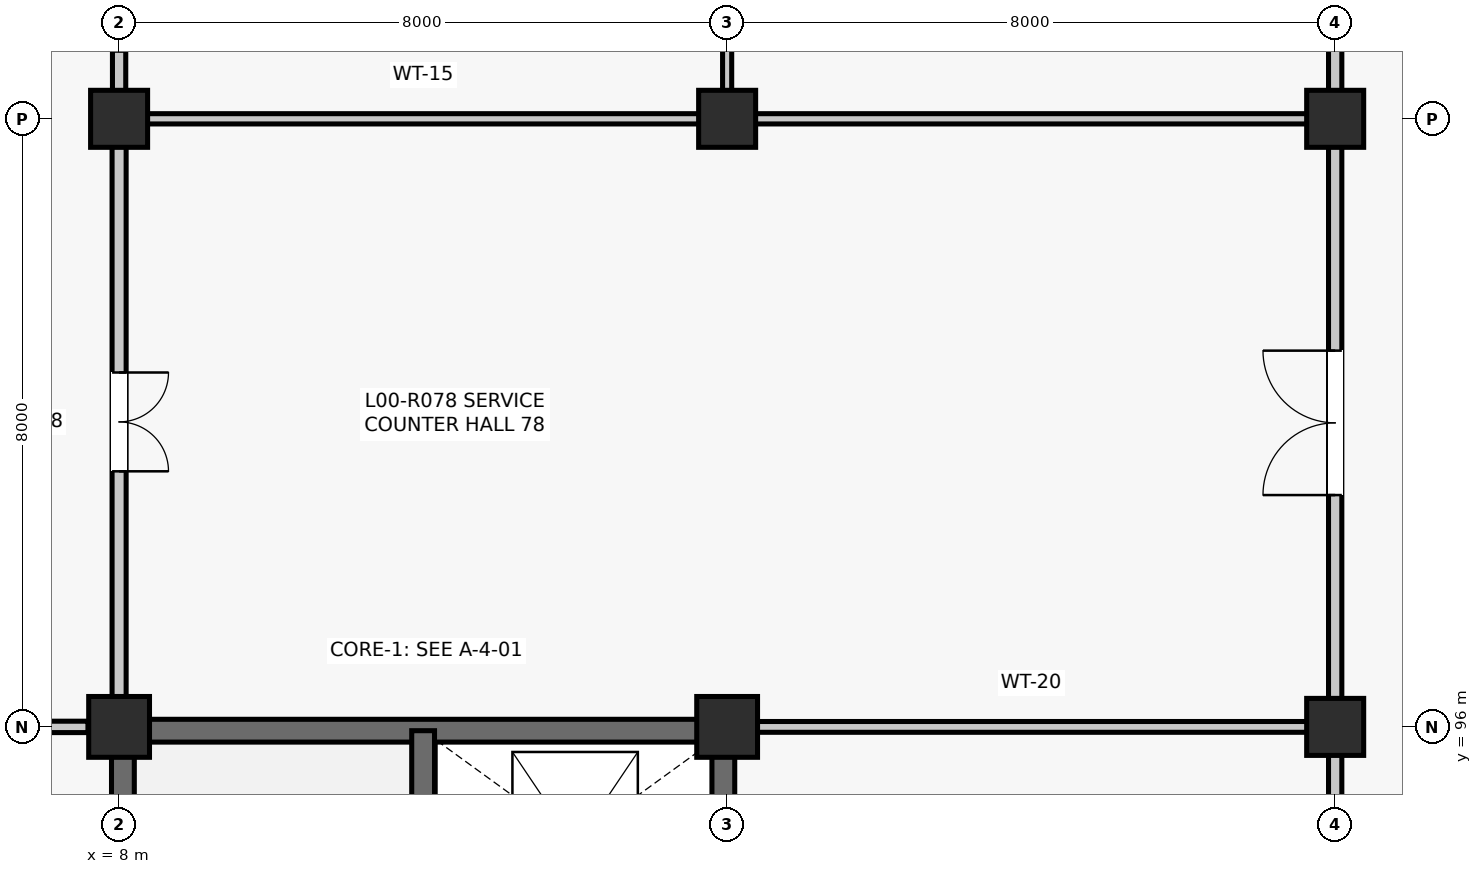
"""IFC4 building model, lengths in metres.
Left out: names, types, materials, properties, quantities, classifications, styles, units other than length and angle.
Written with IfcOpenShell. Run it as: python <this file> out.ifc"""

import sys

from ifc_helpers import new_model, si_unit, direction, frame, frame_2d, origin, origin_2d, place, context, subcontext, project, spatial, rectangle, extrude, element, fill, save


model = new_model("IFC4")
c1 = context("Model", 3, precision=1e-05, world=origin(), true_north=direction((0.0, 1.0)))
c2 = subcontext(c1, "Body", "Model", "MODEL_VIEW")
j1 = project(units=[si_unit("LENGTHUNIT", "METRE"), si_unit("PLANEANGLEUNIT", "RADIAN")], contexts=[c1])
p1 = place(None, origin())
s1 = spatial("IfcSite", under=j1, at=p1, CompositionType="ELEMENT")
p2 = place(p1, origin())
s2 = spatial("IfcBuilding", under=s1, at=p2, CompositionType="ELEMENT")
p3 = place(p2, origin())
s3 = spatial("IfcBuildingStorey", under=s2, at=p3, CompositionType="ELEMENT", Elevation=0.0)
p4 = place(p3, frame((8.0, 96.0, 0.0), z_axis=(0.0, 0.0, 1.0), x_axis=(1.0, 0.0, 0.0)))
e1 = element("IfcColumn", 1, at=p4, inside=s3, PredefinedType="COLUMN", context=c2, shape_type="SweptSolid", body=[
    extrude(rectangle(XDim=0.8, YDim=0.8, at=origin_2d()), origin(), (0.0, 0.0, 1.0), 5.28),
])
p5 = place(p3, frame((8.0, 104.0, 0.0), z_axis=(0.0, 0.0, 1.0), x_axis=(1.0, 0.0, 0.0)))
e2 = element("IfcColumn", 2, at=p5, inside=s3, PredefinedType="COLUMN", context=c2, shape_type="SweptSolid", body=[
    extrude(rectangle(XDim=0.75, YDim=0.75, at=origin_2d()), origin(), (0.0, 0.0, 1.0), 5.28),
])
p6 = place(p3, frame((16.0, 96.0, 0.0), z_axis=(0.0, 0.0, 1.0), x_axis=(1.0, 0.0, 0.0)))
e3 = element("IfcColumn", 3, at=p6, inside=s3, PredefinedType="COLUMN", context=c2, shape_type="SweptSolid", body=[
    extrude(rectangle(XDim=0.8, YDim=0.8, at=origin_2d()), origin(), (0.0, 0.0, 1.0), 5.28),
])
for number, where, z_axis, x_axis in (
    (4, (16.0, 104.0, 0.0), (0.0, 0.0, 1.0), (1.0, 0.0, 0.0)),
    (5, (24.0, 96.0, 0.0), (0.0, 0.0, 1.0), (1.0, 0.0, 0.0)),
    (6, (24.0, 104.0, 0.0), (0.0, 0.0, 1.0), (1.0, 0.0, 0.0)),
):
    element("IfcColumn", number, at=place(p3, frame(where, z_axis=z_axis, x_axis=x_axis)), inside=s3, PredefinedType="COLUMN", context=c2, shape_type="SweptSolid", body=[
        extrude(rectangle(XDim=0.75, YDim=0.75, at=origin_2d()), origin(), (0.0, 0.0, 1.0), 5.28),
    ])
for number, where, z_axis, x_axis in (
    (7, (8.05, 88.29, 0.0), (0.0, 0.0, 1.0), (0.0, 1.0, 0.0)),
    (8, (8.29, 95.95, 0.0), (0.0, 0.0, 1.0), (1.0, 0.0, 0.0)),
    (9, (15.95, 88.29, 0.0), (0.0, 0.0, 1.0), (0.0, 1.0, 0.0)),
):
    element("IfcWall", number, at=place(p3, frame(where, z_axis=z_axis, x_axis=x_axis)), inside=s3, PredefinedType="SHEAR", context=c2, shape_type="SweptSolid", body=[
        extrude(rectangle(XDim=7.42, YDim=0.3, at=frame_2d((3.71, 0.0))), origin(), (0.0, 0.0, 1.0), 5.035),
    ])
p7 = place(p3, frame((12.0, 88.05, 0.0), z_axis=(0.0, 0.0, 1.0), x_axis=(0.0, 1.0, 0.0)))
e10 = element("IfcWall", 10, at=p7, inside=s3, PredefinedType="SHEAR", context=c2, shape_type="SweptSolid", body=[
    extrude(rectangle(XDim=7.9, YDim=0.3, at=frame_2d((3.95, 0.0))), origin(), (0.0, 0.0, 1.0), 5.035),
])
p8 = place(p7, frame((0.55, 0.0, 0.0)))
e11 = element("IfcOpeningElement", 11, at=p8, cuts=e10, PredefinedType="OPENING", context=c2, shape_type="SweptSolid", body=[
    extrude(rectangle(XDim=1.1, YDim=2.15, at=frame_2d((0.55, 1.075))), frame((0.0, 0.16, 0.0), z_axis=(0.0, -1.0, 0.0), x_axis=(1.0, 0.0, 0.0)), (0.0, 0.0, 1.0), 0.32),
])
p9 = place(p3, frame((2.75, 96.0, 0.0), z_axis=(0.0, 0.0, 1.0), x_axis=(1.0, 0.0, 0.0)))
e12 = element("IfcWall", 12, at=p9, inside=s3, PredefinedType="PARTITIONING", context=c2, shape_type="SweptSolid", body=[
    extrude(rectangle(XDim=4.84, YDim=0.15, at=frame_2d((2.42, 0.0))), origin(), (0.0, 0.0, 1.0), 4.327),
])
p10 = place(p3, frame((8.0, 96.39, 0.0), z_axis=(0.0, 0.0, 1.0), x_axis=(0.0, 1.0, 0.0)))
e13 = element("IfcWall", 13, at=p10, inside=s3, PredefinedType="PARTITIONING", context=c2, shape_type="SweptSolid", body=[
    extrude(rectangle(XDim=7.245, YDim=0.185, at=frame_2d((3.623, 0.0))), origin(), (0.0, 0.0, 1.0), 4.412),
])
p11 = place(p10, frame((2.972, 0.0, 0.0)))
e14 = element("IfcOpeningElement", 14, at=p11, cuts=e13, PredefinedType="OPENING", context=c2, shape_type="SweptSolid", body=[
    extrude(rectangle(XDim=1.3, YDim=2.2, at=frame_2d((0.65, 1.1))), frame((0.0, 0.103, 0.0), z_axis=(0.0, -1.0, 0.0), x_axis=(1.0, 0.0, 0.0)), (0.0, 0.0, 1.0), 0.205),
])
p12 = place(p3, frame((8.0, 104.365, 0.0), z_axis=(0.0, 0.0, 1.0), x_axis=(0.0, 1.0, 0.0)))
e15 = element("IfcWall", 15, at=p12, inside=s3, PredefinedType="PARTITIONING", context=c2, shape_type="SweptSolid", body=[
    extrude(rectangle(XDim=7.27, YDim=0.175, at=frame_2d((3.635, 0.0))), origin(), (0.0, 0.0, 1.0), 4.404),
])
p13 = place(p12, frame((0.52, 0.0, 0.0)))
e16 = element("IfcOpeningElement", 16, at=p13, cuts=e15, PredefinedType="OPENING", context=c2, shape_type="SweptSolid", body=[
    extrude(rectangle(XDim=0.94, YDim=2.12, at=frame_2d((0.47, 1.06))), frame((0.0, 0.097, 0.0), z_axis=(0.0, -1.0, 0.0), x_axis=(1.0, 0.0, 0.0)), (0.0, 0.0, 1.0), 0.195),
])
p14 = place(p3, frame((8.365, 104.0, 0.0), z_axis=(0.0, 0.0, 1.0), x_axis=(1.0, 0.0, 0.0)))
e17 = element("IfcWall", 17, at=p14, inside=s3, PredefinedType="PARTITIONING", context=c2, shape_type="SweptSolid", body=[
    extrude(rectangle(XDim=7.27, YDim=0.135, at=frame_2d((3.635, 0.0))), origin(), (0.0, 0.0, 1.0), 4.336),
])
p15 = place(p3, frame((16.0, 104.365, 0.0), z_axis=(0.0, 0.0, 1.0), x_axis=(0.0, 1.0, 0.0)))
e18 = element("IfcWall", 18, at=p15, inside=s3, PredefinedType="PARTITIONING", context=c2, shape_type="SweptSolid", body=[
    extrude(rectangle(XDim=7.27, YDim=0.12, at=frame_2d((3.635, 0.0))), origin(), (0.0, 0.0, 1.0), 4.471),
])
p16 = place(p3, frame((24.0, 88.365, 0.0), z_axis=(0.0, 0.0, 1.0), x_axis=(0.0, 1.0, 0.0)))
e19 = element("IfcWall", 19, at=p16, inside=s3, PredefinedType="PARTITIONING", context=c2, shape_type="SweptSolid", body=[
    extrude(rectangle(XDim=7.27, YDim=0.175, at=frame_2d((3.635, 0.0))), origin(), (0.0, 0.0, 1.0), 4.404),
])
p17 = place(p16, frame((1.292, 0.0, 0.0)))
e20 = element("IfcOpeningElement", 20, at=p17, cuts=e19, PredefinedType="OPENING", context=c2, shape_type="SweptSolid", body=[
    extrude(rectangle(XDim=1.05, YDim=2.15, at=frame_2d((0.525, 1.075))), frame((0.0, 0.097, 0.0), z_axis=(0.0, -1.0, 0.0), x_axis=(1.0, 0.0, 0.0)), (0.0, 0.0, 1.0), 0.195),
])
p18 = place(p16, frame((5.291, 0.0, 0.0)))
e21 = element("IfcOpeningElement", 21, at=p18, cuts=e19, PredefinedType="OPENING", context=c2, shape_type="SweptSolid", body=[
    extrude(rectangle(XDim=1.05, YDim=2.15, at=frame_2d((0.525, 1.075))), frame((0.0, 0.097, 0.0), z_axis=(0.0, -1.0, 0.0), x_axis=(1.0, 0.0, 0.0)), (0.0, 0.0, 1.0), 0.195),
])
p19 = place(p3, frame((16.39, 96.0, 0.0), z_axis=(0.0, 0.0, 1.0), x_axis=(1.0, 0.0, 0.0)))
e22 = element("IfcWall", 22, at=p19, inside=s3, PredefinedType="PARTITIONING", context=c2, shape_type="SweptSolid", body=[
    extrude(rectangle(XDim=7.245, YDim=0.142, at=frame_2d((3.623, 0.0))), origin(), (0.0, 0.0, 1.0), 4.336),
])
p20 = place(p3, frame((24.0, 96.365, 0.0), z_axis=(0.0, 0.0, 1.0), x_axis=(0.0, 1.0, 0.0)))
e23 = element("IfcWall", 23, at=p20, inside=s3, PredefinedType="PARTITIONING", context=c2, shape_type="SweptSolid", body=[
    extrude(rectangle(XDim=7.27, YDim=0.175, at=frame_2d((3.635, 0.0))), origin(), (0.0, 0.0, 1.0), 4.471),
])
p21 = place(p20, frame((2.685, 0.0, 0.0)))
e24 = element("IfcOpeningElement", 24, at=p21, cuts=e23, PredefinedType="OPENING", context=c2, shape_type="SweptSolid", body=[
    extrude(rectangle(XDim=1.9, YDim=2.38, at=frame_2d((0.95, 1.19))), frame((0.0, 0.097, 0.0), z_axis=(0.0, -1.0, 0.0), x_axis=(1.0, 0.0, 0.0)), (0.0, 0.0, 1.0), 0.195),
])
p22 = place(p3, frame((16.365, 104.0, 0.0), z_axis=(0.0, 0.0, 1.0), x_axis=(1.0, 0.0, 0.0)))
e25 = element("IfcWall", 25, at=p22, inside=s3, PredefinedType="PARTITIONING", context=c2, shape_type="SweptSolid", body=[
    extrude(rectangle(XDim=7.27, YDim=0.135, at=frame_2d((3.635, 0.0))), origin(), (0.0, 0.0, 1.0), 4.404),
])
p23 = place(p3, frame((24.0, 104.365, 0.0), z_axis=(0.0, 0.0, 1.0), x_axis=(0.0, 1.0, 0.0)))
e26 = element("IfcWall", 26, at=p23, inside=s3, PredefinedType="PARTITIONING", context=c2, shape_type="SweptSolid", body=[
    extrude(rectangle(XDim=7.27, YDim=0.175, at=frame_2d((3.635, 0.0))), origin(), (0.0, 0.0, 1.0), 4.403),
])
p24 = place(p23, frame((3.095, 0.0, 0.0)))
e27 = element("IfcOpeningElement", 27, at=p24, cuts=e26, PredefinedType="OPENING", context=c2, shape_type="SweptSolid", body=[
    extrude(rectangle(XDim=1.08, YDim=2.2, at=frame_2d((0.54, 1.1))), frame((0.0, 0.097, 0.0), z_axis=(0.0, -1.0, 0.0), x_axis=(1.0, 0.0, 0.0)), (0.0, 0.0, 1.0), 0.195),
])
p25 = place(p11, frame((1.3, 0.0, 0.0), z_axis=(0.0, 0.0, 1.0), x_axis=(-1.0, 0.0, 0.0)))
e28 = element("IfcDoor", 28, at=p25, inside=s3, OperationType="DOUBLE_DOOR_SINGLE_SWING", PredefinedType="DOOR", context=c2, shape_type="SweptSolid", body=[
    extrude(rectangle(XDim=1.3, YDim=2.2, at=frame_2d((0.65, 1.1))), frame((0.0, 0.025, 0.0), z_axis=(0.0, -1.0, 0.0), x_axis=(1.0, 0.0, 0.0)), (0.0, 0.0, 1.0), 0.05),
])
fill(e14, e28)
p26 = place(p21, origin())
e29 = element("IfcDoor", 29, at=p26, inside=s3, OperationType="DOUBLE_DOOR_SINGLE_SWING", PredefinedType="DOOR", context=c2, shape_type="SweptSolid", body=[
    extrude(rectangle(XDim=1.9, YDim=2.38, at=frame_2d((0.95, 1.19))), frame((0.0, 0.025, 0.0), z_axis=(0.0, -1.0, 0.0), x_axis=(1.0, 0.0, 0.0)), (0.0, 0.0, 1.0), 0.05),
])
fill(e24, e29)
save(model, sys.argv[1])
